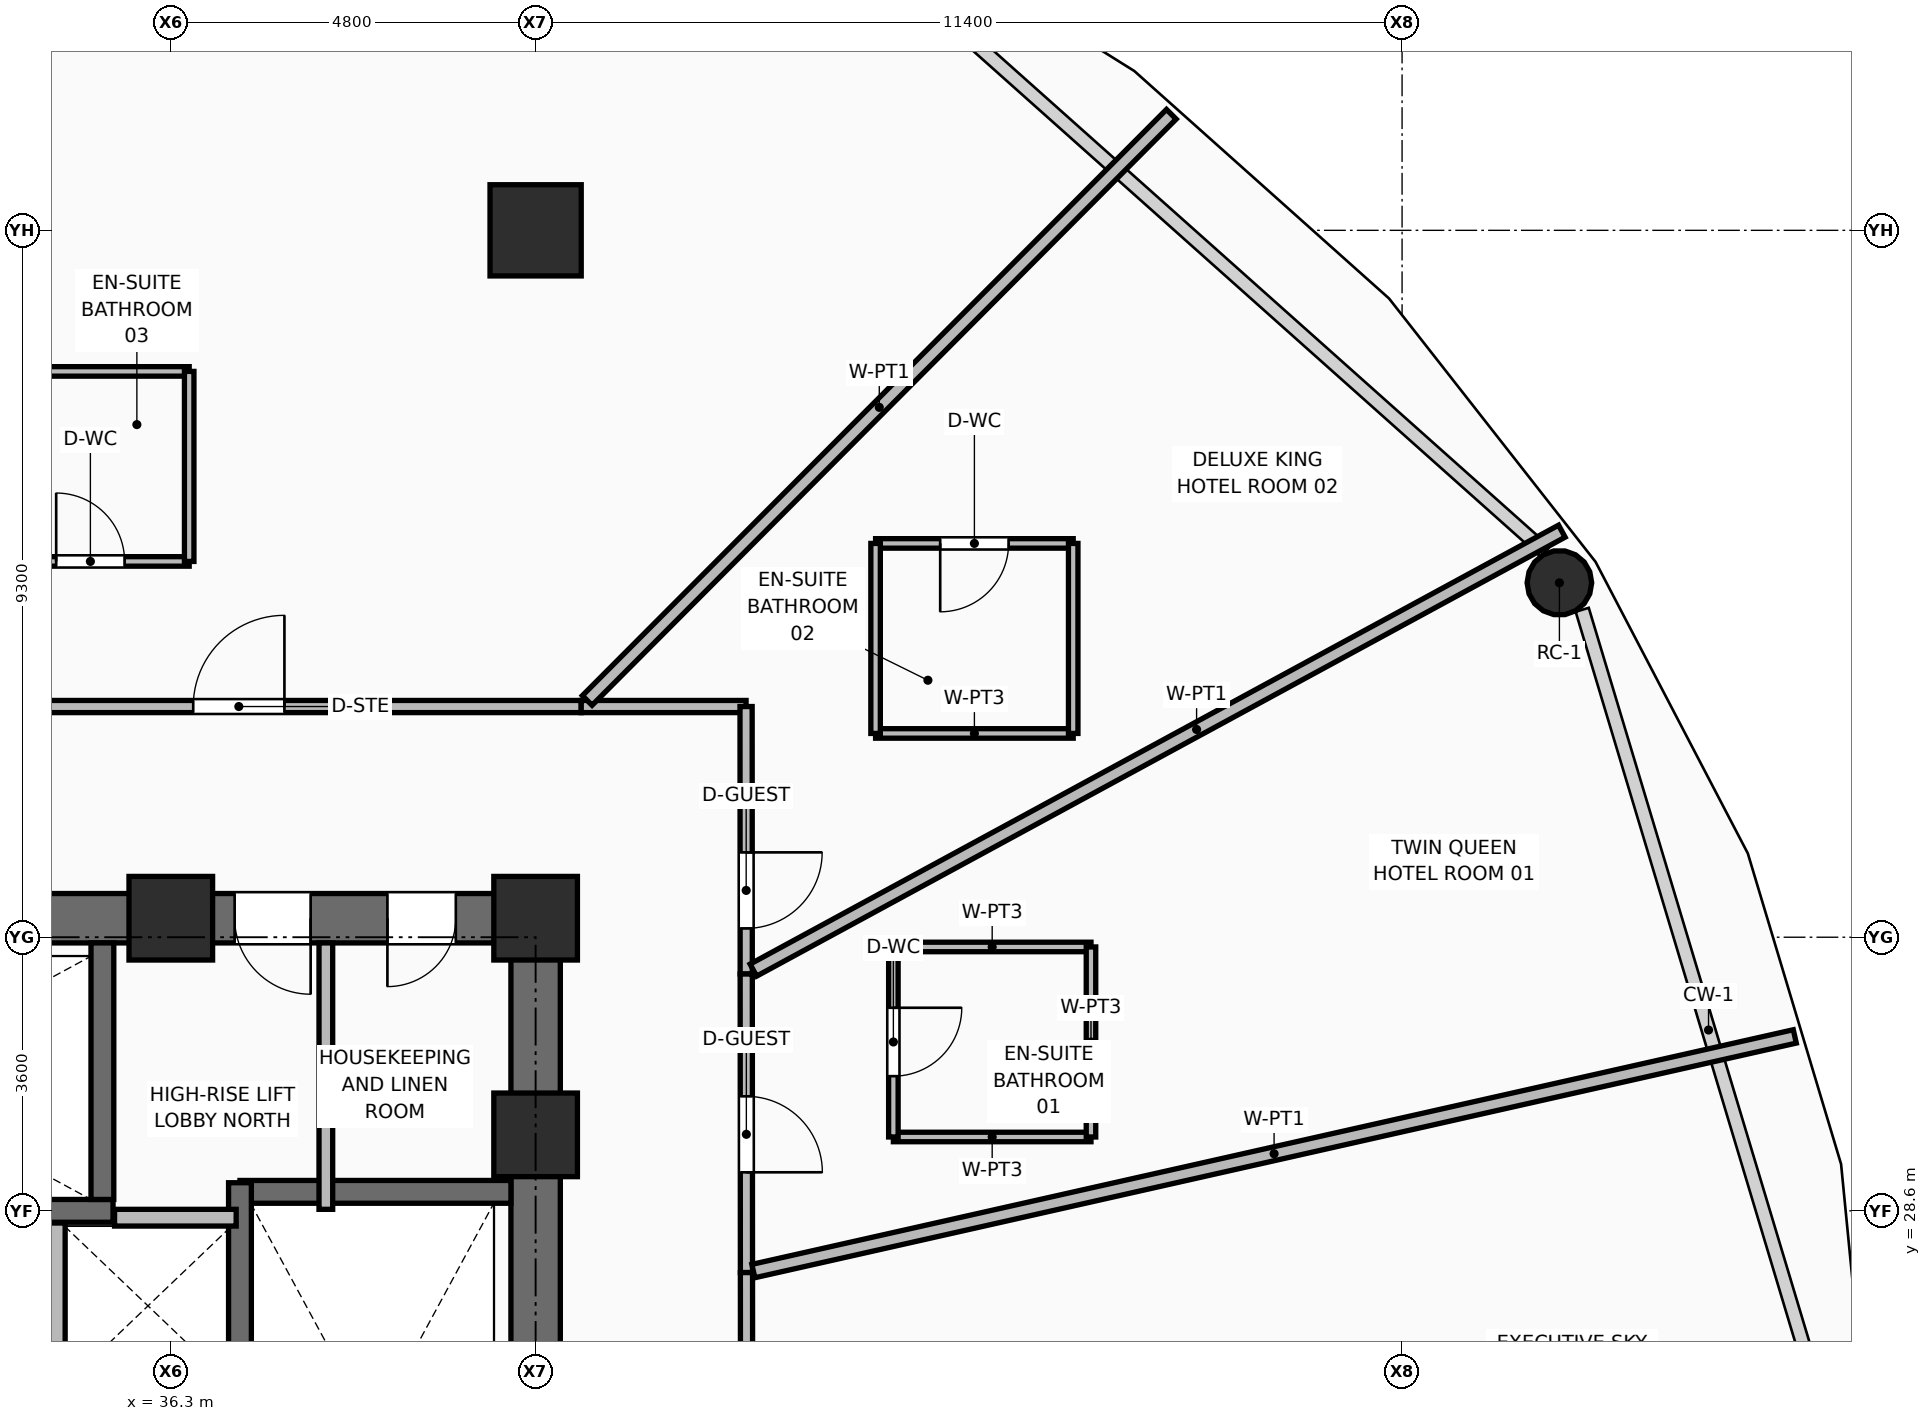
"""IFC4 building model, lengths in metres.
Left out: names, types, materials, properties, quantities, classifications, styles, units other than length and angle.
Written with IfcOpenShell. Run it as: python <this file> out.ifc"""

import sys

from ifc_helpers import new_model, si_unit, direction, frame, frame_2d, origin, origin_2d, place, context, subcontext, project, spatial, rectangle, hollow_rectangle, hollow_circle, extrude, element, fill, save


model = new_model("IFC4")
c1 = context("Model", 3, precision=1e-05, world=origin(), true_north=direction((0.0, 1.0)))
c2 = subcontext(c1, "Body", "Model", "MODEL_VIEW")
j1 = project(units=[si_unit("LENGTHUNIT", "METRE"), si_unit("PLANEANGLEUNIT", "RADIAN")], contexts=[c1])
p1 = place(None, origin())
s1 = spatial("IfcSite", under=j1, at=p1, CompositionType="ELEMENT")
p2 = place(p1, origin())
s2 = spatial("IfcBuilding", under=s1, at=p2, CompositionType="ELEMENT")
p3 = place(p2, frame((0.0, 0.0, 49.5)))
s3 = spatial("IfcBuildingStorey", under=s2, at=p3, CompositionType="ELEMENT", Elevation=49.5)
for number, where, z_axis, x_axis in (
    (1, (41.1, 29.6, 0.0), (0.0, 0.0, 1.0), (1.0, 0.0, 0.0)),
    (2, (36.3, 32.45, 0.0), (0.0, 0.0, 1.0), (1.0, 0.0, 0.0)),
    (3, (41.1, 32.45, 0.0), (0.0, 0.0, 1.0), (1.0, 0.0, 0.0)),
):
    element("IfcColumn", number, at=place(p3, frame(where, z_axis=z_axis, x_axis=x_axis)), inside=s3, PredefinedType="COLUMN", context=c2, shape_type="SweptSolid", body=[
        extrude(rectangle(XDim=1.1, YDim=1.1, at=origin_2d()), origin(), (0.0, 0.0, 1.0), 3.75),
    ])
p4 = place(p3, frame((41.1, 41.5, 0.0), z_axis=(0.0, 0.0, 1.0), x_axis=(1.0, 0.0, 0.0)))
e4 = element("IfcColumn", 4, at=p4, inside=s3, PredefinedType="COLUMN", context=c2, shape_type="SweptSolid", body=[
    extrude(hollow_rectangle(XDim=1.2, YDim=1.2, WallThickness=0.045, at=origin_2d()), origin(), (0.0, 0.0, 1.0), 3.75),
])
p5 = place(p3, frame((54.57, 36.863, 0.0), z_axis=(0.0, 0.0, 1.0), x_axis=(1.0, 0.0, 0.0)))
e5 = element("IfcColumn", 5, at=p5, inside=s3, PredefinedType="COLUMN", context=c2, shape_type="SweptSolid", body=[
    extrude(hollow_circle(Radius=0.425, WallThickness=0.04, at=origin_2d()), origin(), (0.0, 0.0, 1.0), 3.57),
])
p6 = place(p3, frame((34.8, 26.23, 0.0), z_axis=(0.0, 0.0, 1.0), x_axis=(0.0, 1.0, 0.0)))
e6 = element("IfcWall", 6, at=p6, inside=s3, PredefinedType="PARTITIONING", context=c2, shape_type="SweptSolid", body=[
    extrude(rectangle(XDim=2.21, YDim=0.22, at=frame_2d((1.105, 0.0))), origin(), (0.0, 0.0, 1.0), 3.545),
])
p7 = place(p3, frame((21.575, 32.45, 0.0), z_axis=(0.0, 0.0, 1.0), x_axis=(1.0, 0.0, 0.0)))
e7 = element("IfcWall", 7, at=p7, inside=s3, PredefinedType="SHEAR", context=c2, shape_type="SweptSolid", body=[
    extrude(rectangle(XDim=19.85, YDim=0.65, at=frame_2d((9.925, 0.0))), origin(), (0.0, 0.0, 1.0), 3.57),
])
p8 = place(p7, frame((2.175, 0.0, 0.0)))
e8 = element("IfcOpeningElement", 8, at=p8, cuts=e7, PredefinedType="OPENING", context=c2, shape_type="SweptSolid", body=[
    extrude(rectangle(XDim=1.1, YDim=2.1, at=frame_2d((0.55, 1.05))), frame((0.0, 0.335, 0.0), z_axis=(0.0, -1.0, 0.0), x_axis=(1.0, 0.0, 0.0)), (0.0, 0.0, 1.0), 0.67),
])
p9 = place(p7, frame((15.565, 0.0, 0.0)))
e9 = element("IfcOpeningElement", 9, at=p9, cuts=e7, PredefinedType="OPENING", context=c2, shape_type="SweptSolid", body=[
    extrude(rectangle(XDim=1.0, YDim=2.1, at=frame_2d((0.5, 1.05))), frame((0.0, 0.335, 0.0), z_axis=(0.0, -1.0, 0.0), x_axis=(1.0, 0.0, 0.0)), (0.0, 0.0, 1.0), 0.67),
])
p10 = place(p7, frame((17.575, 0.0, 0.0)))
e10 = element("IfcOpeningElement", 10, at=p10, cuts=e7, PredefinedType="OPENING", context=c2, shape_type="SweptSolid", body=[
    extrude(rectangle(XDim=0.9, YDim=2.1, at=frame_2d((0.45, 1.05))), frame((0.0, 0.335, 0.0), z_axis=(0.0, -1.0, 0.0), x_axis=(1.0, 0.0, 0.0)), (0.0, 0.0, 1.0), 0.67),
])
p11 = place(p3, frame((41.1, 18.125, 0.0), z_axis=(0.0, 0.0, 1.0), x_axis=(0.0, 1.0, 0.0)))
e11 = element("IfcWall", 11, at=p11, inside=s3, PredefinedType="SHEAR", context=c2, shape_type="SweptSolid", body=[
    extrude(rectangle(XDim=14.0, YDim=0.65, at=frame_2d((7.0, 0.0))), origin(), (0.0, 0.0, 1.0), 3.57),
])
p12 = place(p11, frame((3.335, 0.0, 0.0)))
e12 = element("IfcOpeningElement", 12, at=p12, cuts=e11, PredefinedType="OPENING", context=c2, shape_type="SweptSolid", body=[
    extrude(rectangle(XDim=1.05, YDim=2.1, at=frame_2d((0.525, 1.05))), frame((0.0, 0.335, 0.0), z_axis=(0.0, -1.0, 0.0), x_axis=(1.0, 0.0, 0.0)), (0.0, 0.0, 1.0), 0.67),
])
p13 = place(p3, frame((37.21, 28.85, 0.0), z_axis=(0.0, 0.0, 1.0), x_axis=(1.0, 0.0, 0.0)))
e13 = element("IfcWall", 13, at=p13, inside=s3, PredefinedType="SHEAR", context=c2, shape_type="SweptSolid", body=[
    extrude(rectangle(XDim=3.565, YDim=0.3, at=frame_2d((1.782, 0.0))), origin(), (0.0, 0.0, 1.0), 3.57),
])
p14 = place(p3, frame((37.21, 20.98, 0.0), z_axis=(0.0, 0.0, 1.0), x_axis=(0.0, 1.0, 0.0)))
e14 = element("IfcWall", 14, at=p14, inside=s3, PredefinedType="SHEAR", context=c2, shape_type="SweptSolid", body=[
    extrude(rectangle(XDim=7.99, YDim=0.3, at=frame_2d((3.995, 0.0))), origin(), (0.0, 0.0, 1.0), 3.57),
])
p15 = place(p3, frame((27.51, 28.6, 0.0), z_axis=(0.0, 0.0, 1.0), x_axis=(1.0, 0.0, 0.0)))
e15 = element("IfcWall", 15, at=p15, inside=s3, PredefinedType="SHEAR", context=c2, shape_type="SweptSolid", body=[
    extrude(rectangle(XDim=8.03, YDim=0.3, at=frame_2d((4.015, 0.0))), origin(), (0.0, 0.0, 1.0), 3.57),
])
p16 = place(p3, frame((35.4, 28.75, 0.0), z_axis=(0.0, 0.0, 1.0), x_axis=(0.0, 1.0, 0.0)))
e16 = element("IfcWall", 16, at=p16, inside=s3, PredefinedType="SHEAR", context=c2, shape_type="SweptSolid", body=[
    extrude(rectangle(XDim=3.375, YDim=0.3, at=frame_2d((1.688, 0.0))), origin(), (0.0, 0.0, 1.0), 3.57),
])
p17 = place(p3, frame((35.56, 28.51, 0.0), z_axis=(0.0, 0.0, 1.0), x_axis=(1.0, 0.0, 0.0)))
e17 = element("IfcWall", 17, at=p17, inside=s3, PredefinedType="PARTITIONING", context=c2, shape_type="SweptSolid", body=[
    extrude(rectangle(XDim=1.6, YDim=0.22, at=frame_2d((0.8, 0.0))), origin(), (0.0, 0.0, 1.0), 3.55),
])
p18 = place(p3, frame((38.34, 28.62, 0.0), z_axis=(0.0, 0.0, 1.0), x_axis=(0.0, 1.0, 0.0)))
e18 = element("IfcWall", 18, at=p18, inside=s3, PredefinedType="PARTITIONING", context=c2, shape_type="SweptSolid", body=[
    extrude(rectangle(XDim=3.505, YDim=0.18, at=frame_2d((1.752, 0.0))), origin(), (0.0, 0.0, 1.0), 3.55),
])
p19 = place(p3, frame((32.691, 35.235, 0.0), z_axis=(0.0, 0.0, 1.0), x_axis=(1.0, 0.0, 0.0)))
e19 = element("IfcWall", 19, at=p19, inside=s3, PredefinedType="PARTITIONING", context=c2, shape_type="SweptSolid", body=[
    extrude(rectangle(XDim=9.009, YDim=0.16, at=frame_2d((4.504, 0.0))), origin(), (0.0, 0.0, 1.0), 2.928),
])
p20 = place(p19, frame((3.904, 0.0, 0.0)))
e20 = element("IfcOpeningElement", 20, at=p20, cuts=e19, PredefinedType="OPENING", context=c2, shape_type="SweptSolid", body=[
    extrude(rectangle(XDim=1.2, YDim=2.1, at=frame_2d((0.6, 1.05))), frame((0.0, 0.09, 0.0), z_axis=(0.0, -1.0, 0.0), x_axis=(1.0, 0.0, 0.0)), (0.0, 0.0, 1.0), 0.18),
])
p21 = place(p3, frame((41.7, 35.235, 0.0), z_axis=(0.0, 0.0, 1.0), x_axis=(1.0, 0.0, 0.0)))
e21 = element("IfcWall", 21, at=p21, inside=s3, PredefinedType="PARTITIONING", context=c2, shape_type="SweptSolid", body=[
    extrude(rectangle(XDim=2.169, YDim=0.16, at=frame_2d((1.084, 0.0))), origin(), (0.0, 0.0, 1.0), 2.928),
])
p22 = place(p3, frame((43.869, 35.235, 0.0), z_axis=(0.0, 0.0, 1.0), x_axis=(0.00062439283, -0.999999805067, 0.0)))
e22 = element("IfcWall", 22, at=p22, inside=s3, PredefinedType="PARTITIONING", context=c2, shape_type="SweptSolid", body=[
    extrude(rectangle(XDim=3.519, YDim=0.16, at=frame_2d((1.76, 0.0))), origin(), (0.0, 0.0, 1.0), 2.928),
])
p23 = place(p22, frame((1.919, 0.0, 0.0)))
e23 = element("IfcOpeningElement", 23, at=p23, cuts=e22, PredefinedType="OPENING", context=c2, shape_type="SweptSolid", body=[
    extrude(rectangle(XDim=1.0, YDim=2.1, at=frame_2d((0.5, 1.05))), frame((0.0, 0.09, 0.0), z_axis=(0.0, -1.0, 0.0), x_axis=(1.0, 0.0, 0.0)), (0.0, 0.0, 1.0), 0.18),
])
p24 = place(p3, frame((43.871, 31.716, 0.0), z_axis=(0.0, 0.0, 1.0), x_axis=(0.000745850995, -0.999999721853, 0.0)))
e24 = element("IfcWall", 24, at=p24, inside=s3, PredefinedType="PARTITIONING", context=c2, shape_type="SweptSolid", body=[
    extrude(rectangle(XDim=3.928, YDim=0.16, at=frame_2d((1.964, 0.0))), origin(), (0.0, 0.0, 1.0), 3.55),
])
p25 = place(p24, frame((1.609, 0.0, 0.0)))
e25 = element("IfcOpeningElement", 25, at=p25, cuts=e24, PredefinedType="OPENING", context=c2, shape_type="SweptSolid", body=[
    extrude(rectangle(XDim=1.0, YDim=2.1, at=frame_2d((0.5, 1.05))), frame((0.0, 0.09, 0.0), z_axis=(0.0, -1.0, 0.0), x_axis=(1.0, 0.0, 0.0)), (0.0, 0.0, 1.0), 0.18),
])
p26 = place(p3, frame((43.874, 27.788, 0.0), z_axis=(0.0, 0.0, 1.0), x_axis=(0.000777907194, -0.99999969743, 0.0)))
e26 = element("IfcWall", 26, at=p26, inside=s3, PredefinedType="PARTITIONING", context=c2, shape_type="SweptSolid", body=[
    extrude(rectangle(XDim=3.766, YDim=0.16, at=frame_2d((1.883, 0.0))), origin(), (0.0, 0.0, 1.0), 3.55),
])
p27 = place(p26, frame((1.358, 0.0, 0.0)))
e27 = element("IfcOpeningElement", 27, at=p27, cuts=e26, PredefinedType="OPENING", context=c2, shape_type="SweptSolid", body=[
    extrude(rectangle(XDim=1.2, YDim=2.1, at=frame_2d((0.6, 1.05))), frame((0.0, 0.09, 0.0), z_axis=(0.0, -1.0, 0.0), x_axis=(1.0, 0.0, 0.0)), (0.0, 0.0, 1.0), 0.18),
])
p28 = place(p3, frame((43.965, 27.808, 0.0), z_axis=(0.0, 0.0, 1.0), x_axis=(0.975548947741, 0.219782279907, 0.0)))
e28 = element("IfcWall", 28, at=p28, inside=s3, PredefinedType="PARTITIONING", context=c2, shape_type="SweptSolid", body=[
    extrude(rectangle(XDim=14.045, YDim=0.18, at=frame_2d((7.023, 0.0))), origin(), (0.0, 0.0, 1.0), 2.775),
])
p29 = place(p3, frame((43.965, 31.767, 0.0), z_axis=(0.0, 0.0, 1.0), x_axis=(0.878834340918, 0.477127028393, 0.0)))
e29 = element("IfcWall", 29, at=p29, inside=s3, PredefinedType="PARTITIONING", context=c2, shape_type="SweptSolid", body=[
    extrude(rectangle(XDim=12.104, YDim=0.18, at=frame_2d((6.052, 0.0))), origin(), (0.0, 0.0, 1.0), 2.775),
])
p30 = place(p3, frame((41.779, 35.315, 0.0), z_axis=(0.0, 0.0, 1.0), x_axis=(0.705861156653, 0.708350215309, 0.0)))
e30 = element("IfcWall", 30, at=p30, inside=s3, PredefinedType="PARTITIONING", context=c2, shape_type="SweptSolid", body=[
    extrude(rectangle(XDim=10.887, YDim=0.18, at=frame_2d((5.444, 0.0))), origin(), (0.0, 0.0, 1.0), 2.775),
])
for number, where, z_axis, x_axis in (
    (31, (45.807, 29.572, 0.0), (0.0, 0.0, 1.0), (1.0, 0.0, 0.0)),
    (32, (45.807, 32.072, 0.0), (0.0, 0.0, 1.0), (1.0, 0.0, 0.0)),
):
    element("IfcWall", number, at=place(p3, frame(where, z_axis=z_axis, x_axis=x_axis)), inside=s3, PredefinedType="PARTITIONING", context=c2, shape_type="SweptSolid", body=[
        extrude(rectangle(XDim=2.6, YDim=0.125, at=frame_2d((1.3, 0.0))), origin(), (0.0, 0.0, 1.0), 3.55),
    ])
p31 = place(p3, frame((45.807, 29.572, 0.0), z_axis=(0.0, 0.0, 1.0), x_axis=(0.0, 1.0, 0.0)))
e33 = element("IfcWall", 33, at=p31, inside=s3, PredefinedType="PARTITIONING", context=c2, shape_type="SweptSolid", body=[
    extrude(rectangle(XDim=2.5, YDim=0.125, at=frame_2d((1.25, 0.0))), origin(), (0.0, 0.0, 1.0), 3.55),
])
p32 = place(p31, frame((0.8, 0.0, 0.0)))
e34 = element("IfcOpeningElement", 34, at=p32, cuts=e33, PredefinedType="OPENING", context=c2, shape_type="SweptSolid", body=[
    extrude(rectangle(XDim=0.9, YDim=2.1, at=frame_2d((0.45, 1.05))), frame((0.0, 0.073, 0.0), z_axis=(0.0, -1.0, 0.0), x_axis=(1.0, 0.0, 0.0)), (0.0, 0.0, 1.0), 0.145),
])
p33 = place(p3, frame((48.407, 29.572, 0.0), z_axis=(0.0, 0.0, 1.0), x_axis=(0.0, 1.0, 0.0)))
e35 = element("IfcWall", 35, at=p33, inside=s3, PredefinedType="PARTITIONING", context=c2, shape_type="SweptSolid", body=[
    extrude(rectangle(XDim=2.5, YDim=0.125, at=frame_2d((1.25, 0.0))), origin(), (0.0, 0.0, 1.0), 3.55),
])
p34 = place(p3, frame((45.573, 34.881, 0.0), z_axis=(0.0, 0.0, 1.0), x_axis=(1.0, 0.0, 0.0)))
e36 = element("IfcWall", 36, at=p34, inside=s3, PredefinedType="PARTITIONING", context=c2, shape_type="SweptSolid", body=[
    extrude(rectangle(XDim=2.6, YDim=0.125, at=frame_2d((1.3, 0.0))), origin(), (0.0, 0.0, 1.0), 2.928),
])
p35 = place(p3, frame((45.573, 37.381, 0.0), z_axis=(0.0, 0.0, 1.0), x_axis=(1.0, 0.0, 0.0)))
e37 = element("IfcWall", 37, at=p35, inside=s3, PredefinedType="PARTITIONING", context=c2, shape_type="SweptSolid", body=[
    extrude(rectangle(XDim=2.6, YDim=0.125, at=frame_2d((1.3, 0.0))), origin(), (0.0, 0.0, 1.0), 3.55),
])
p36 = place(p35, frame((0.85, 0.0, 0.0)))
e38 = element("IfcOpeningElement", 38, at=p36, cuts=e37, PredefinedType="OPENING", context=c2, shape_type="SweptSolid", body=[
    extrude(rectangle(XDim=0.9, YDim=2.1, at=frame_2d((0.45, 1.05))), frame((0.0, 0.073, 0.0), z_axis=(0.0, -1.0, 0.0), x_axis=(1.0, 0.0, 0.0)), (0.0, 0.0, 1.0), 0.145),
])
p37 = place(p3, frame((45.573, 34.881, 0.0), z_axis=(0.0, 0.0, 1.0), x_axis=(0.0, 1.0, 0.0)))
e39 = element("IfcWall", 39, at=p37, inside=s3, PredefinedType="PARTITIONING", context=c2, shape_type="SweptSolid", body=[
    extrude(rectangle(XDim=2.5, YDim=0.125, at=frame_2d((1.25, 0.0))), origin(), (0.0, 0.0, 1.0), 3.55),
])
p38 = place(p3, frame((48.173, 34.881, 0.0), z_axis=(0.0, 0.0, 1.0), x_axis=(0.0, 1.0, 0.0)))
e40 = element("IfcWall", 40, at=p38, inside=s3, PredefinedType="PARTITIONING", context=c2, shape_type="SweptSolid", body=[
    extrude(rectangle(XDim=2.5, YDim=0.125, at=frame_2d((1.25, 0.0))), origin(), (0.0, 0.0, 1.0), 2.928),
])
p39 = place(p3, frame((33.942, 37.144, 0.0), z_axis=(0.0, 0.0, 1.0), x_axis=(1.0, 0.0, 0.0)))
e41 = element("IfcWall", 41, at=p39, inside=s3, PredefinedType="PARTITIONING", context=c2, shape_type="SweptSolid", body=[
    extrude(rectangle(XDim=2.6, YDim=0.125, at=frame_2d((1.3, 0.0))), origin(), (0.0, 0.0, 1.0), 3.55),
])
p40 = place(p39, frame((0.85, 0.0, 0.0)))
e42 = element("IfcOpeningElement", 42, at=p40, cuts=e41, PredefinedType="OPENING", context=c2, shape_type="SweptSolid", body=[
    extrude(rectangle(XDim=0.9, YDim=2.1, at=frame_2d((0.45, 1.05))), frame((0.0, 0.073, 0.0), z_axis=(0.0, -1.0, 0.0), x_axis=(1.0, 0.0, 0.0)), (0.0, 0.0, 1.0), 0.145),
])
p41 = place(p3, frame((33.942, 39.644, 0.0), z_axis=(0.0, 0.0, 1.0), x_axis=(1.0, 0.0, 0.0)))
e43 = element("IfcWall", 43, at=p41, inside=s3, PredefinedType="PARTITIONING", context=c2, shape_type="SweptSolid", body=[
    extrude(rectangle(XDim=2.6, YDim=0.125, at=frame_2d((1.3, 0.0))), origin(), (0.0, 0.0, 1.0), 3.55),
])
p42 = place(p3, frame((36.542, 37.144, 0.0), z_axis=(0.0, 0.0, 1.0), x_axis=(0.0, 1.0, 0.0)))
e44 = element("IfcWall", 44, at=p42, inside=s3, PredefinedType="PARTITIONING", context=c2, shape_type="SweptSolid", body=[
    extrude(rectangle(XDim=2.5, YDim=0.125, at=frame_2d((1.25, 0.0))), origin(), (0.0, 0.0, 1.0), 3.55),
])
p43 = place(p9, frame((1.0, 0.0, 0.0), z_axis=(0.0, 0.0, 1.0), x_axis=(-1.0, 0.0, 0.0)))
e45 = element("IfcDoor", 45, at=p43, inside=s3, OperationType="SINGLE_SWING_LEFT", PredefinedType="DOOR", context=c2, shape_type="SweptSolid", body=[
    extrude(rectangle(XDim=1.0, YDim=2.1, at=frame_2d((0.5, 1.05))), frame((0.0, 0.025, 0.0), z_axis=(0.0, -1.0, 0.0), x_axis=(1.0, 0.0, 0.0)), (0.0, 0.0, 1.0), 0.05),
])
fill(e9, e45)
p44 = place(p10, frame((0.9, 0.0, 0.0), z_axis=(0.0, 0.0, 1.0), x_axis=(-1.0, 0.0, 0.0)))
e46 = element("IfcDoor", 46, at=p44, inside=s3, OperationType="SINGLE_SWING_RIGHT", PredefinedType="DOOR", context=c2, shape_type="SweptSolid", body=[
    extrude(rectangle(XDim=0.9, YDim=2.1, at=frame_2d((0.45, 1.05))), frame((0.0, 0.025, 0.0), z_axis=(0.0, -1.0, 0.0), x_axis=(1.0, 0.0, 0.0)), (0.0, 0.0, 1.0), 0.05),
])
fill(e10, e46)
p45 = place(p32, frame((0.9, 0.0, 0.0), z_axis=(0.0, 0.0, 1.0), x_axis=(-1.0, 0.0, 0.0)))
e47 = element("IfcDoor", 47, at=p45, inside=s3, OperationType="SINGLE_SWING_LEFT", PredefinedType="DOOR", context=c2, shape_type="SweptSolid", body=[
    extrude(rectangle(XDim=0.9, YDim=2.1, at=frame_2d((0.45, 1.05))), frame((0.0, 0.025, 0.0), z_axis=(0.0, -1.0, 0.0), x_axis=(1.0, 0.0, 0.0)), (0.0, 0.0, 1.0), 0.05),
])
fill(e34, e47)
p46 = place(p25, origin())
e48 = element("IfcDoor", 48, at=p46, inside=s3, OperationType="SINGLE_SWING_RIGHT", PredefinedType="DOOR", context=c2, shape_type="SweptSolid", body=[
    extrude(rectangle(XDim=1.0, YDim=2.1, at=frame_2d((0.5, 1.05))), frame((0.0, 0.025, 0.0), z_axis=(0.0, -1.0, 0.0), x_axis=(1.0, 0.0, 0.0)), (0.0, 0.0, 1.0), 0.05),
])
fill(e25, e48)
p47 = place(p36, frame((0.9, 0.0, 0.0), z_axis=(0.0, 0.0, 1.0), x_axis=(-1.0, 0.0, 0.0)))
e49 = element("IfcDoor", 49, at=p47, inside=s3, OperationType="SINGLE_SWING_RIGHT", PredefinedType="DOOR", context=c2, shape_type="SweptSolid", body=[
    extrude(rectangle(XDim=0.9, YDim=2.1, at=frame_2d((0.45, 1.05))), frame((0.0, 0.025, 0.0), z_axis=(0.0, -1.0, 0.0), x_axis=(1.0, 0.0, 0.0)), (0.0, 0.0, 1.0), 0.05),
])
fill(e38, e49)
p48 = place(p23, origin())
e50 = element("IfcDoor", 50, at=p48, inside=s3, OperationType="SINGLE_SWING_LEFT", PredefinedType="DOOR", context=c2, shape_type="SweptSolid", body=[
    extrude(rectangle(XDim=1.0, YDim=2.1, at=frame_2d((0.5, 1.05))), frame((0.0, 0.025, 0.0), z_axis=(0.0, -1.0, 0.0), x_axis=(1.0, 0.0, 0.0)), (0.0, 0.0, 1.0), 0.05),
])
fill(e23, e50)
p49 = place(p40, origin())
e51 = element("IfcDoor", 51, at=p49, inside=s3, OperationType="SINGLE_SWING_LEFT", PredefinedType="DOOR", context=c2, shape_type="SweptSolid", body=[
    extrude(rectangle(XDim=0.9, YDim=2.1, at=frame_2d((0.45, 1.05))), frame((0.0, 0.025, 0.0), z_axis=(0.0, -1.0, 0.0), x_axis=(1.0, 0.0, 0.0)), (0.0, 0.0, 1.0), 0.05),
])
fill(e42, e51)
p50 = place(p20, origin())
e52 = element("IfcDoor", 52, at=p50, inside=s3, OperationType="SINGLE_SWING_RIGHT", PredefinedType="DOOR", context=c2, shape_type="SweptSolid", body=[
    extrude(rectangle(XDim=1.2, YDim=2.1, at=frame_2d((0.6, 1.05))), frame((0.0, 0.025, 0.0), z_axis=(0.0, -1.0, 0.0), x_axis=(1.0, 0.0, 0.0)), (0.0, 0.0, 1.0), 0.05),
])
fill(e20, e52)
save(model, sys.argv[1])
